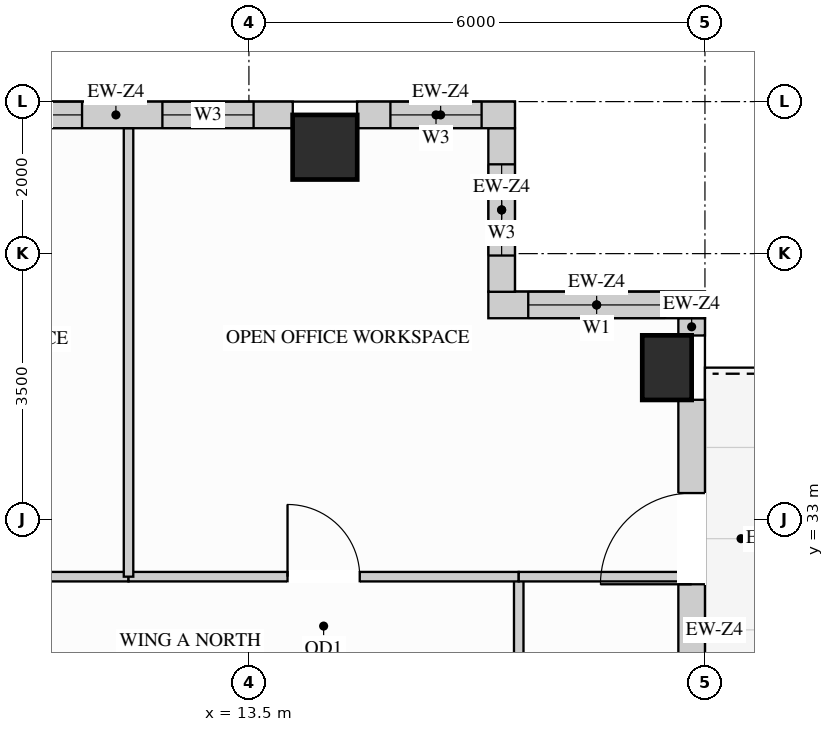
"""IFC4 building model, lengths in metres.
Left out: names, types, materials, properties, quantities, classifications, styles, units other than length and angle.
Written with IfcOpenShell. Run it as: python <this file> out.ifc"""

import sys

from ifc_helpers import new_model, si_unit, direction, frame, frame_2d, origin, origin_2d, place, context, subcontext, project, spatial, rectangle, extrude, source, transform, mapped, element, fill, save


model = new_model("IFC4")
c1 = context("Model", 3, precision=1e-05, world=origin(), true_north=direction((0.0, 1.0)))
c2 = subcontext(c1, "Body", "Model", "MODEL_VIEW")
j1 = project(units=[si_unit("LENGTHUNIT", "METRE"), si_unit("PLANEANGLEUNIT", "RADIAN")], contexts=[c1])
p1 = place(None, origin())
s1 = spatial("IfcSite", under=j1, at=p1, CompositionType="ELEMENT")
p2 = place(p1, origin())
s2 = spatial("IfcBuilding", under=s1, at=p2, CompositionType="ELEMENT")
p3 = place(p2, frame((0.0, 0.0, 237.6)))
s3 = spatial("IfcBuildingStorey", under=s2, at=p3, CompositionType="ELEMENT", Elevation=237.6)
m1 = source(origin(), c2, "Body", "SweptSolid", [
    extrude(rectangle(XDim=0.65, YDim=0.85, at=origin_2d()), origin(), (0.0, 0.0, 1.0), 3.4),
])
p4 = place(p3, frame((19.0, 35.0, 0.0), z_axis=(0.0, 0.0, 1.0), x_axis=(1.0, 0.0, 0.0)))
e1 = element("IfcColumn", 1, at=p4, inside=s3, PredefinedType="COLUMN", context=c2, shape_type="MappedRepresentation", body=[
    mapped(m1, transform((0.0, 0.0, 0.0), x_axis=(1.0, 0.0, 0.0), y_axis=(0.0, 1.0, 0.0), z_axis=(0.0, 0.0, 1.0))),
])
m2 = source(origin(), c2, "Body", "SweptSolid", [
    extrude(rectangle(XDim=0.85, YDim=0.85, at=origin_2d()), origin(), (0.0, 0.0, 1.0), 3.4),
])
p5 = place(p3, frame((14.5, 37.9, 0.0), z_axis=(0.0, 0.0, 1.0), x_axis=(1.0, 0.0, 0.0)))
e2 = element("IfcColumn", 2, at=p5, inside=s3, PredefinedType="COLUMN", context=c2, shape_type="MappedRepresentation", body=[
    mapped(m2, transform((0.0, 0.0, 0.0), x_axis=(1.0, 0.0, 0.0), y_axis=(0.0, 1.0, 0.0), z_axis=(0.0, 0.0, 1.0))),
])
p6 = place(p3, frame((19.325, 30.923, 0.0), z_axis=(0.0, 0.0, 1.0), x_axis=(0.0, 1.0, 0.0)))
e3 = element("IfcWall", 3, at=p6, inside=s3, PredefinedType="SOLIDWALL", context=c2, shape_type="SweptSolid", body=[
    extrude(rectangle(XDim=3.654, YDim=0.35, at=frame_2d((1.827, 0.0))), origin(), (0.0, 0.0, 1.0), 2.619),
])
p7 = place(p6, frame((1.227, 0.0, 0.0)))
e4 = element("IfcOpeningElement", 4, at=p7, cuts=e3, PredefinedType="OPENING", context=c2, shape_type="SweptSolid", body=[
    extrude(rectangle(XDim=1.2, YDim=2.15, at=frame_2d((0.6, 1.075))), frame((0.0, 0.185, 0.0), z_axis=(0.0, -1.0, 0.0), x_axis=(1.0, 0.0, 0.0)), (0.0, 0.0, 1.0), 0.37),
])
m3 = source(origin(), c2, "Body", "SweptSolid", [
    extrude(rectangle(XDim=0.229, YDim=0.35, at=frame_2d((0.115, 0.0))), origin(), (0.0, 0.0, 1.0), 3.385),
])
p8 = place(p3, frame((19.325, 35.423, 0.0), z_axis=(0.0, 0.0, 1.0), x_axis=(0.0, 1.0, 0.0)))
e5 = element("IfcWall", 5, at=p8, inside=s3, PredefinedType="SOLIDWALL", context=c2, shape_type="MappedRepresentation", body=[
    mapped(m3, transform((0.0, 0.0, 0.0), x_axis=(1.0, 0.0, 0.0), y_axis=(0.0, 1.0, 0.0), z_axis=(0.0, 0.0, 1.0))),
])
p9 = place(p3, frame((19.5, 35.825, 0.0), z_axis=(0.0, 0.0, 1.0), x_axis=(-1.0, 0.0, 0.0)))
e6 = element("IfcWall", 6, at=p9, inside=s3, PredefinedType="SOLIDWALL", context=c2, shape_type="SweptSolid", body=[
    extrude(rectangle(XDim=2.85, YDim=0.35, at=frame_2d((1.425, 0.0))), origin(), (0.0, 0.0, 1.0), 3.385),
])
p10 = place(p9, frame((0.525, 0.0, 0.78)))
e7 = element("IfcOpeningElement", 7, at=p10, cuts=e6, PredefinedType="OPENING", context=c2, shape_type="SweptSolid", body=[
    extrude(rectangle(XDim=1.8, YDim=2.1, at=frame_2d((0.9, 1.05))), frame((0.0, 0.185, 0.0), z_axis=(0.0, -1.0, 0.0), x_axis=(1.0, 0.0, 0.0)), (0.0, 0.0, 1.0), 0.37),
])
p11 = place(p3, frame((16.825, 35.998, 0.0), z_axis=(0.0, 0.0, 1.0), x_axis=(0.0, 1.0, 0.0)))
e8 = element("IfcWall", 8, at=p11, inside=s3, PredefinedType="SOLIDWALL", context=c2, shape_type="SweptSolid", body=[
    extrude(rectangle(XDim=2.154, YDim=0.35, at=frame_2d((1.077, 0.0))), origin(), (0.0, 0.0, 1.0), 3.385),
])
p12 = place(p11, frame((0.477, 0.0, 0.78)))
e9 = element("IfcOpeningElement", 9, at=p12, cuts=e8, PredefinedType="OPENING", context=c2, shape_type="SweptSolid", body=[
    extrude(rectangle(XDim=1.2, YDim=2.1, at=frame_2d((0.6, 1.05))), frame((0.0, 0.185, 0.0), z_axis=(0.0, -1.0, 0.0), x_axis=(1.0, 0.0, 0.0)), (0.0, 0.0, 1.0), 0.37),
])
p13 = place(p3, frame((17.0, 38.325, 0.0), z_axis=(0.0, 0.0, 1.0), x_axis=(-1.0, 0.0, 0.0)))
e10 = element("IfcWall", 10, at=p13, inside=s3, PredefinedType="SOLIDWALL", context=c2, shape_type="SweptSolid", body=[
    extrude(rectangle(XDim=2.077, YDim=0.35, at=frame_2d((1.039, 0.0))), origin(), (0.0, 0.0, 1.0), 3.385),
])
p14 = place(p13, frame((0.438, 0.0, 0.78)))
e11 = element("IfcOpeningElement", 11, at=p14, cuts=e10, PredefinedType="OPENING", context=c2, shape_type="SweptSolid", body=[
    extrude(rectangle(XDim=1.2, YDim=2.1, at=frame_2d((0.6, 1.05))), frame((0.0, 0.185, 0.0), z_axis=(0.0, -1.0, 0.0), x_axis=(1.0, 0.0, 0.0)), (0.0, 0.0, 1.0), 0.37),
])
p15 = place(p3, frame((14.077, 38.325, 0.0), z_axis=(0.0, 0.0, 1.0), x_axis=(-1.0, 0.0, 0.0)))
e12 = element("IfcWall", 12, at=p15, inside=s3, PredefinedType="SOLIDWALL", context=c2, shape_type="SweptSolid", body=[
    extrude(rectangle(XDim=4.654, YDim=0.35, at=frame_2d((2.327, 0.0))), origin(), (0.0, 0.0, 1.0), 3.385),
])
p16 = place(p15, frame((0.515, 0.0, 0.78)))
e13 = element("IfcOpeningElement", 13, at=p16, cuts=e12, PredefinedType="OPENING", context=c2, shape_type="SweptSolid", body=[
    extrude(rectangle(XDim=1.2, YDim=2.1, at=frame_2d((0.6, 1.05))), frame((0.0, 0.185, 0.0), z_axis=(0.0, -1.0, 0.0), x_axis=(1.0, 0.0, 0.0)), (0.0, 0.0, 1.0), 0.37),
])
p17 = place(p15, frame((2.772, 0.0, 0.78)))
e14 = element("IfcOpeningElement", 14, at=p17, cuts=e12, PredefinedType="OPENING", context=c2, shape_type="SweptSolid", body=[
    extrude(rectangle(XDim=1.2, YDim=2.1, at=frame_2d((0.6, 1.05))), frame((0.0, 0.185, 0.0), z_axis=(0.0, -1.0, 0.0), x_axis=(1.0, 0.0, 0.0)), (0.0, 0.0, 1.0), 0.37),
])
p18 = place(p3, frame((17.05, 26.05, 0.0), z_axis=(0.0, 0.0, 1.0), x_axis=(0.0, 1.0, 0.0)))
e15 = element("IfcWall", 15, at=p18, inside=s3, PredefinedType="PARTITIONING", context=c2, shape_type="SweptSolid", body=[
    extrude(rectangle(XDim=6.2, YDim=0.125, at=frame_2d((3.1, 0.0))), origin(), (0.0, 0.0, 1.0), 3.385),
])
p19 = place(p18, frame((2.625, 0.0, 0.0)))
e16 = element("IfcOpeningElement", 16, at=p19, cuts=e15, PredefinedType="OPENING", context=c2, shape_type="SweptSolid", body=[
    extrude(rectangle(XDim=0.95, YDim=2.15, at=frame_2d((0.475, 1.075))), frame((0.0, 0.073, 0.0), z_axis=(0.0, -1.0, 0.0), x_axis=(1.0, 0.0, 0.0)), (0.0, 0.0, 1.0), 0.145),
])
p20 = place(p3, frame((7.121, 32.25, 0.0), z_axis=(0.0, 0.0, 1.0), x_axis=(1.0, 0.0, 0.0)))
e17 = element("IfcWall", 17, at=p20, inside=s3, PredefinedType="PARTITIONING", context=c2, shape_type="SweptSolid", body=[
    extrude(rectangle(XDim=4.795, YDim=0.125, at=frame_2d((2.397, 0.0))), origin(), (0.0, 0.0, 1.0), 3.385),
])
p21 = place(p20, frame((1.923, 0.0, 0.0)))
e18 = element("IfcOpeningElement", 18, at=p21, cuts=e17, PredefinedType="OPENING", context=c2, shape_type="SweptSolid", body=[
    extrude(rectangle(XDim=0.95, YDim=2.15, at=frame_2d((0.475, 1.075))), frame((0.0, 0.073, 0.0), z_axis=(0.0, -1.0, 0.0), x_axis=(1.0, 0.0, 0.0)), (0.0, 0.0, 1.0), 0.145),
])
p22 = place(p3, frame((11.916, 32.25, 0.0), z_axis=(0.0, 0.0, 1.0), x_axis=(1.0, 0.0, 0.0)))
e19 = element("IfcWall", 19, at=p22, inside=s3, PredefinedType="PARTITIONING", context=c2, shape_type="SweptSolid", body=[
    extrude(rectangle(XDim=5.134, YDim=0.125, at=frame_2d((2.567, 0.0))), origin(), (0.0, 0.0, 1.0), 3.385),
])
p23 = place(p22, frame((2.092, 0.0, 0.0)))
e20 = element("IfcOpeningElement", 20, at=p23, cuts=e19, PredefinedType="OPENING", context=c2, shape_type="SweptSolid", body=[
    extrude(rectangle(XDim=0.95, YDim=2.15, at=frame_2d((0.475, 1.075))), frame((0.0, 0.073, 0.0), z_axis=(0.0, -1.0, 0.0), x_axis=(1.0, 0.0, 0.0)), (0.0, 0.0, 1.0), 0.145),
])
m4 = source(origin(), c2, "Body", "SweptSolid", [
    extrude(rectangle(XDim=2.098, YDim=0.125, at=frame_2d((1.049, 0.0))), origin(), (0.0, 0.0, 1.0), 3.385),
])
p24 = place(p3, frame((17.05, 32.25, 0.0), z_axis=(0.0, 0.0, 1.0), x_axis=(1.0, 0.0, 0.0)))
e21 = element("IfcWall", 21, at=p24, inside=s3, PredefinedType="PARTITIONING", context=c2, shape_type="MappedRepresentation", body=[
    mapped(m4, transform((0.0, 0.0, 0.0), x_axis=(1.0, 0.0, 0.0), y_axis=(0.0, 1.0, 0.0), z_axis=(0.0, 0.0, 1.0))),
])
m5 = source(origin(), c2, "Body", "SweptSolid", [
    extrude(rectangle(XDim=5.898, YDim=0.125, at=frame_2d((2.949, 0.0))), origin(), (0.0, 0.0, 1.0), 3.385),
])
p25 = place(p3, frame((11.916, 32.25, 0.0), z_axis=(0.0, 0.0, 1.0), x_axis=(0.0, 1.0, 0.0)))
e22 = element("IfcWall", 22, at=p25, inside=s3, PredefinedType="PARTITIONING", context=c2, shape_type="MappedRepresentation", body=[
    mapped(m5, transform((0.0, 0.0, 0.0), x_axis=(1.0, 0.0, 0.0), y_axis=(0.0, 1.0, 0.0), z_axis=(0.0, 0.0, 1.0))),
])
m6 = source(origin(), c2, "Body", "SweptSolid", [
    extrude(rectangle(XDim=1.2, YDim=2.15, at=frame_2d((0.6, 1.075))), frame((0.0, 0.025, 0.0), z_axis=(0.0, -1.0, 0.0), x_axis=(1.0, 0.0, 0.0)), (0.0, 0.0, 1.0), 0.05),
])
p26 = place(p7, frame((1.2, 0.0, 0.0), z_axis=(0.0, 0.0, 1.0), x_axis=(-1.0, 0.0, 0.0)))
e23 = element("IfcDoor", 23, at=p26, inside=s3, OperationType="SINGLE_SWING_LEFT", PredefinedType="DOOR", context=c2, shape_type="MappedRepresentation", body=[
    mapped(m6, transform((0.0, 0.0, 0.0), x_axis=(1.0, 0.0, 0.0), y_axis=(0.0, 1.0, 0.0), z_axis=(0.0, 0.0, 1.0))),
])
fill(e4, e23)
m7 = source(origin(), c2, "Body", "SweptSolid", [
    extrude(rectangle(XDim=0.95, YDim=2.15, at=frame_2d((0.475, 1.075))), frame((0.0, 0.025, 0.0), z_axis=(0.0, -1.0, 0.0), x_axis=(1.0, 0.0, 0.0)), (0.0, 0.0, 1.0), 0.05),
])
p27 = place(p23, origin())
e24 = element("IfcDoor", 24, at=p27, inside=s3, OperationType="SINGLE_SWING_LEFT", PredefinedType="DOOR", context=c2, shape_type="MappedRepresentation", body=[
    mapped(m7, transform((0.0, 0.0, 0.0), x_axis=(1.0, 0.0, 0.0), y_axis=(0.0, 1.0, 0.0), z_axis=(0.0, 0.0, 1.0))),
])
fill(e20, e24)
m8 = source(origin(), c2, "Body", "SweptSolid", [
    extrude(rectangle(XDim=1.8, YDim=2.1, at=frame_2d((0.9, 1.05))), frame((0.0, 0.03, 0.0), z_axis=(0.0, -1.0, 0.0), x_axis=(1.0, 0.0, 0.0)), (0.0, 0.0, 1.0), 0.06),
])
p28 = place(p10, origin())
e25 = element("IfcWindow", 25, at=p28, inside=s3, PartitioningType="SINGLE_PANEL", PredefinedType="WINDOW", context=c2, shape_type="MappedRepresentation", body=[
    mapped(m8, transform((0.0, 0.0, 0.0), x_axis=(1.0, 0.0, 0.0), y_axis=(0.0, 1.0, 0.0), z_axis=(0.0, 0.0, 1.0))),
])
fill(e7, e25)
m9 = source(origin(), c2, "Body", "SweptSolid", [
    extrude(rectangle(XDim=1.2, YDim=2.1, at=frame_2d((0.6, 1.05))), frame((0.0, 0.03, 0.0), z_axis=(0.0, -1.0, 0.0), x_axis=(1.0, 0.0, 0.0)), (0.0, 0.0, 1.0), 0.06),
])
p29 = place(p12, origin())
e26 = element("IfcWindow", 26, at=p29, inside=s3, PartitioningType="SINGLE_PANEL", PredefinedType="WINDOW", context=c2, shape_type="MappedRepresentation", body=[
    mapped(m9, transform((0.0, 0.0, 0.0), x_axis=(1.0, 0.0, 0.0), y_axis=(0.0, 1.0, 0.0), z_axis=(0.0, 0.0, 1.0))),
])
fill(e9, e26)
p30 = place(p14, origin())
e27 = element("IfcWindow", 27, at=p30, inside=s3, PartitioningType="SINGLE_PANEL", PredefinedType="WINDOW", context=c2, shape_type="MappedRepresentation", body=[
    mapped(m9, transform((0.0, 0.0, 0.0), x_axis=(1.0, 0.0, 0.0), y_axis=(0.0, 1.0, 0.0), z_axis=(0.0, 0.0, 1.0))),
])
fill(e11, e27)
p31 = place(p16, origin())
e28 = element("IfcWindow", 28, at=p31, inside=s3, PartitioningType="SINGLE_PANEL", PredefinedType="WINDOW", context=c2, shape_type="MappedRepresentation", body=[
    mapped(m9, transform((0.0, 0.0, 0.0), x_axis=(1.0, 0.0, 0.0), y_axis=(0.0, 1.0, 0.0), z_axis=(0.0, 0.0, 1.0))),
])
fill(e13, e28)
p32 = place(p17, origin())
e29 = element("IfcWindow", 29, at=p32, inside=s3, PartitioningType="SINGLE_PANEL", PredefinedType="WINDOW", context=c2, shape_type="MappedRepresentation", body=[
    mapped(m9, transform((0.0, 0.0, 0.0), x_axis=(1.0, 0.0, 0.0), y_axis=(0.0, 1.0, 0.0), z_axis=(0.0, 0.0, 1.0))),
])
fill(e14, e29)
save(model, sys.argv[1])
